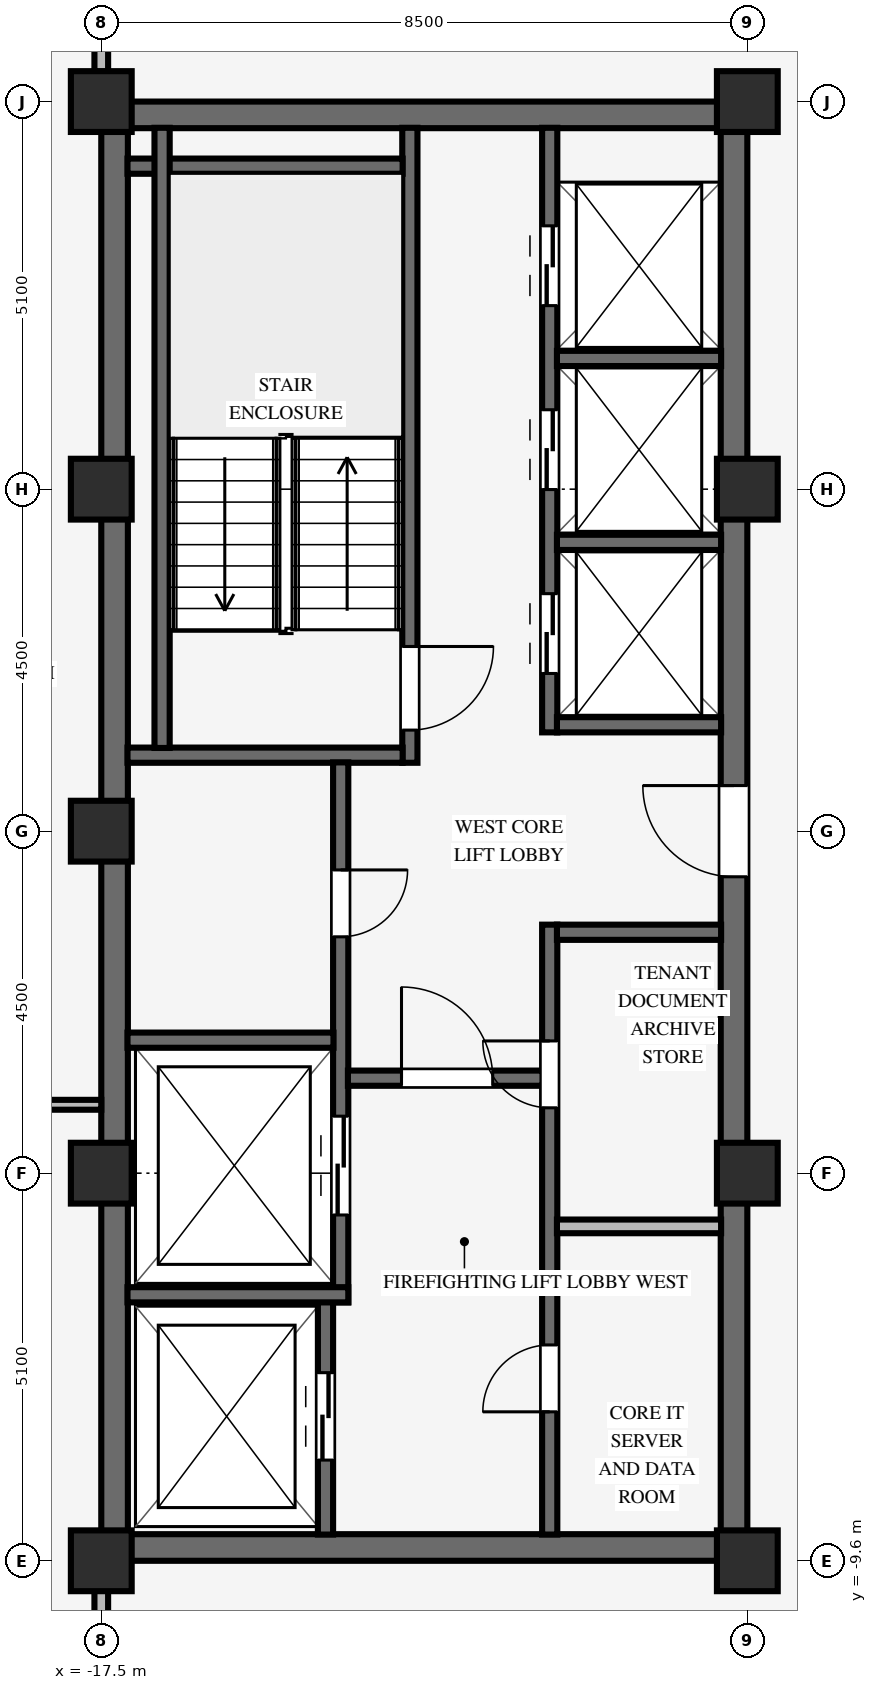
"""IFC4 building model, lengths in metres.
Left out: names, types, materials, properties, quantities, classifications, styles, units other than length and angle.
Written with IfcOpenShell. Run it as: python <this file> out.ifc"""

import sys

from ifc_helpers import new_model, si_unit, direction, frame, frame_2d, origin, origin_2d, place, context, subcontext, project, spatial, rectangle, extrude, source, transform, mapped, element, fill, save


model = new_model("IFC4")
c1 = context("Model", 3, precision=1e-05, world=origin(), true_north=direction((0.0, 1.0)))
c2 = subcontext(c1, "Body", "Model", "MODEL_VIEW")
j1 = project(units=[si_unit("LENGTHUNIT", "METRE"), si_unit("PLANEANGLEUNIT", "RADIAN")], contexts=[c1])
p1 = place(None, origin())
s1 = spatial("IfcSite", under=j1, at=p1, CompositionType="ELEMENT")
p2 = place(p1, origin())
s2 = spatial("IfcBuilding", under=s1, at=p2, CompositionType="ELEMENT")
p3 = place(p2, frame((0.0, 0.0, 272.55)))
s3 = spatial("IfcBuildingStorey", under=s2, at=p3, CompositionType="ELEMENT", Elevation=272.55)
for number, where, z_axis, x_axis in (
    (1, (-17.5, -9.425, 0.0), (0.0, 0.0, 1.0), (1.0, 0.0, 0.0)),
    (2, (-17.5, 9.425, 0.0), (0.0, 0.0, 1.0), (1.0, 0.0, 0.0)),
):
    element("IfcWall", number, at=place(p3, frame(where, z_axis=z_axis, x_axis=x_axis)), inside=s3, PredefinedType="SHEAR", context=c2, shape_type="SweptSolid", body=[
        extrude(rectangle(XDim=8.5, YDim=0.35, at=frame_2d((4.25, 0.0))), origin(), (0.0, 0.0, 1.0), 3.37),
    ])
p4 = place(p3, frame((-17.325, -9.255, 0.0), z_axis=(0.0, 0.0, 1.0), x_axis=(0.0, 1.0, 0.0)))
e3 = element("IfcWall", 3, at=p4, inside=s3, PredefinedType="SHEAR", context=c2, shape_type="SweptSolid", body=[
    extrude(rectangle(XDim=18.51, YDim=0.35, at=frame_2d((9.255, 0.0))), origin(), (0.0, 0.0, 1.0), 3.37),
])
p5 = place(p3, frame((-9.175, -9.255, 0.0), z_axis=(0.0, 0.0, 1.0), x_axis=(0.0, 1.0, 0.0)))
e4 = element("IfcWall", 4, at=p5, inside=s3, PredefinedType="SHEAR", context=c2, shape_type="SweptSolid", body=[
    extrude(rectangle(XDim=18.51, YDim=0.35, at=frame_2d((9.255, 0.0))), origin(), (0.0, 0.0, 1.0), 3.37),
])
p6 = place(p5, frame((8.655, 0.0, 0.0)))
e5 = element("IfcOpeningElement", 5, at=p6, cuts=e4, PredefinedType="OPENING", context=c2, shape_type="SweptSolid", body=[
    extrude(rectangle(XDim=1.2, YDim=2.15, at=frame_2d((0.6, 1.075))), frame((0.0, 0.185, 0.0), z_axis=(0.0, -1.0, 0.0), x_axis=(1.0, 0.0, 0.0)), (0.0, 0.0, 1.0), 0.37),
])
for number, where, z_axis, x_axis in (
    (6, (-17.5, -9.6, 0.0), (0.0, 0.0, 1.0), (1.0, 0.0, 0.0)),
    (7, (-17.5, -4.5, 0.0), (0.0, 0.0, 1.0), (1.0, 0.0, 0.0)),
    (8, (-17.5, 4.5, 0.0), (0.0, 0.0, 1.0), (1.0, 0.0, 0.0)),
    (9, (-17.5, 9.6, 0.0), (0.0, 0.0, 1.0), (1.0, 0.0, 0.0)),
    (10, (-9.0, -9.6, 0.0), (0.0, 0.0, 1.0), (1.0, 0.0, 0.0)),
    (11, (-9.0, -4.5, 0.0), (0.0, 0.0, 1.0), (1.0, 0.0, 0.0)),
    (12, (-9.0, 4.5, 0.0), (0.0, 0.0, 1.0), (1.0, 0.0, 0.0)),
    (13, (-9.0, 9.6, 0.0), (0.0, 0.0, 1.0), (1.0, 0.0, 0.0)),
    (14, (-17.5, 0.0, 0.0), (0.0, 0.0, 1.0), (1.0, 0.0, 0.0)),
):
    element("IfcColumn", number, at=place(p3, frame(where, z_axis=z_axis, x_axis=x_axis)), inside=s3, PredefinedType="COLUMN", context=c2, shape_type="SweptSolid", body=[
        extrude(rectangle(XDim=0.8, YDim=0.8, at=origin_2d()), origin(), (0.0, 0.0, 1.0), 3.37),
    ])
p7 = place(p3, frame((-13.44, 0.9, 0.0), z_axis=(0.0, 0.0, 1.0), x_axis=(0.0, 1.0, 0.0)))
e15 = element("IfcWall", 15, at=p7, inside=s3, PredefinedType="SHEAR", context=c2, shape_type="SweptSolid", body=[
    extrude(rectangle(XDim=8.355, YDim=0.2, at=frame_2d((4.177, 0.0))), origin(), (0.0, 0.0, 1.0), 3.37),
])
p8 = place(p7, frame((1.53, 0.0, 0.0), z_axis=(0.0, 0.0, 1.0), x_axis=(-1.0, 0.0, 0.0)))
e16 = element("IfcOpeningElement", 16, at=p8, cuts=e15, PredefinedType="OPENING", context=c2, shape_type="SweptSolid", body=[
    extrude(rectangle(XDim=1.1, YDim=2.15, at=frame_2d((0.55, 1.075))), frame((0.0, 0.11, 0.0), z_axis=(0.0, -1.0, 0.0), x_axis=(1.0, 0.0, 0.0)), (0.0, 0.0, 1.0), 0.22),
])
for number, where, z_axis, x_axis in (
    (17, (-17.155, 1.0, 0.0), (0.0, 0.0, 1.0), (1.0, 0.0, 0.0)),
    (18, (-17.155, 8.75, 0.0), (0.0, 0.0, 1.0), (1.0, 0.0, 0.0)),
):
    element("IfcWall", number, at=place(p3, frame(where, z_axis=z_axis, x_axis=x_axis)), inside=s3, PredefinedType="SHEAR", context=c2, shape_type="SweptSolid", body=[
        extrude(rectangle(XDim=3.62, YDim=0.2, at=frame_2d((1.81, 0.0))), origin(), (0.0, 0.0, 1.0), 3.37),
    ])
p9 = place(p3, frame((-16.7, 1.095, 0.0), z_axis=(0.0, 0.0, 1.0), x_axis=(0.0, 1.0, 0.0)))
e19 = element("IfcWall", 19, at=p9, inside=s3, PredefinedType="SHEAR", context=c2, shape_type="SweptSolid", body=[
    extrude(rectangle(XDim=8.16, YDim=0.2, at=frame_2d((4.08, 0.0))), origin(), (0.0, 0.0, 1.0), 3.37),
])
p10 = place(p3, frame((-14.55, -9.255, 0.0), z_axis=(0.0, 0.0, 1.0), x_axis=(0.0, 1.0, 0.0)))
e20 = element("IfcWall", 20, at=p10, inside=s3, PredefinedType="SHEAR", context=c2, shape_type="SweptSolid", body=[
    extrude(rectangle(XDim=3.06, YDim=0.2, at=frame_2d((1.53, 0.0))), origin(), (0.0, 0.0, 1.0), 3.37),
])
p11 = place(p10, frame((0.98, 0.0, 0.0)))
e21 = element("IfcOpeningElement", 21, at=p11, cuts=e20, PredefinedType="OPENING", context=c2, shape_type="SweptSolid", body=[
    extrude(rectangle(XDim=1.15, YDim=2.15, at=frame_2d((0.575, 1.075))), frame((0.0, 0.11, 0.0), z_axis=(0.0, -1.0, 0.0), x_axis=(1.0, 0.0, 0.0)), (0.0, 0.0, 1.0), 0.22),
])
p12 = place(p3, frame((-14.35, -6.2, 0.0), z_axis=(0.0, 0.0, 1.0), x_axis=(0.0, 1.0, 0.0)))
e22 = element("IfcWall", 22, at=p12, inside=s3, PredefinedType="SHEAR", context=c2, shape_type="SweptSolid", body=[
    extrude(rectangle(XDim=7.105, YDim=0.2, at=frame_2d((3.552, 0.0))), origin(), (0.0, 0.0, 1.0), 3.37),
])
p13 = place(p12, frame((5.69, 0.0, 0.0), z_axis=(0.0, 0.0, 1.0), x_axis=(-1.0, 0.0, 0.0)))
e23 = element("IfcOpeningElement", 23, at=p13, cuts=e22, PredefinedType="OPENING", context=c2, shape_type="SweptSolid", body=[
    extrude(rectangle(XDim=0.88, YDim=2.1, at=frame_2d((0.44, 1.05))), frame((0.0, 0.11, 0.0), z_axis=(0.0, -1.0, 0.0), x_axis=(1.0, 0.0, 0.0)), (0.0, 0.0, 1.0), 0.22),
])
p14 = place(p12, frame((1.15, 0.0, 0.0)))
e24 = element("IfcOpeningElement", 24, at=p14, cuts=e22, PredefinedType="OPENING", context=c2, shape_type="SweptSolid", body=[
    extrude(rectangle(XDim=1.3, YDim=2.2, at=frame_2d((0.65, 1.1))), frame((0.0, 0.11, 0.0), z_axis=(0.0, -1.0, 0.0), x_axis=(1.0, 0.0, 0.0)), (0.0, 0.0, 1.0), 0.22),
])
p15 = place(p3, frame((-17.155, -6.1, 0.0), z_axis=(0.0, 0.0, 1.0), x_axis=(1.0, 0.0, 0.0)))
e25 = element("IfcWall", 25, at=p15, inside=s3, PredefinedType="SHEAR", context=c2, shape_type="SweptSolid", body=[
    extrude(rectangle(XDim=2.905, YDim=0.2, at=frame_2d((1.453, 0.0))), origin(), (0.0, 0.0, 1.0), 3.37),
])
p16 = place(p3, frame((-17.155, -2.75, 0.0), z_axis=(0.0, 0.0, 1.0), x_axis=(1.0, 0.0, 0.0)))
e26 = element("IfcWall", 26, at=p16, inside=s3, PredefinedType="SHEAR", context=c2, shape_type="SweptSolid", body=[
    extrude(rectangle(XDim=2.71, YDim=0.2, at=frame_2d((1.355, 0.0))), origin(), (0.0, 0.0, 1.0), 3.37),
])
p17 = place(p3, frame((-11.6, -9.255, 0.0), z_axis=(0.0, 0.0, 1.0), x_axis=(0.0, 1.0, 0.0)))
e27 = element("IfcWall", 27, at=p17, inside=s3, PredefinedType="SHEAR", context=c2, shape_type="SweptSolid", body=[
    extrude(rectangle(XDim=8.025, YDim=0.2, at=frame_2d((4.012, 0.0))), origin(), (0.0, 0.0, 1.0), 3.37),
])
p18 = place(p17, frame((1.615, 0.0, 0.0)))
e28 = element("IfcOpeningElement", 28, at=p18, cuts=e27, PredefinedType="OPENING", context=c2, shape_type="SweptSolid", body=[
    extrude(rectangle(XDim=0.88, YDim=2.1, at=frame_2d((0.44, 1.05))), frame((0.0, 0.11, 0.0), z_axis=(0.0, -1.0, 0.0), x_axis=(1.0, 0.0, 0.0)), (0.0, 0.0, 1.0), 0.22),
])
p19 = place(p17, frame((5.615, 0.0, 0.0)))
e29 = element("IfcOpeningElement", 29, at=p19, cuts=e27, PredefinedType="OPENING", context=c2, shape_type="SweptSolid", body=[
    extrude(rectangle(XDim=0.88, YDim=2.1, at=frame_2d((0.44, 1.05))), frame((0.0, 0.11, 0.0), z_axis=(0.0, -1.0, 0.0), x_axis=(1.0, 0.0, 0.0)), (0.0, 0.0, 1.0), 0.22),
])
p20 = place(p3, frame((-14.255, -3.25, 0.0), z_axis=(0.0, 0.0, 1.0), x_axis=(1.0, 0.0, 0.0)))
e30 = element("IfcWall", 30, at=p20, inside=s3, PredefinedType="SHEAR", context=c2, shape_type="SweptSolid", body=[
    extrude(rectangle(XDim=2.56, YDim=0.2, at=frame_2d((1.28, 0.0))), origin(), (0.0, 0.0, 1.0), 3.37),
])
p21 = place(p20, frame((0.705, 0.0, 0.0)))
e31 = element("IfcOpeningElement", 31, at=p21, cuts=e30, PredefinedType="OPENING", context=c2, shape_type="SweptSolid", body=[
    extrude(rectangle(XDim=1.2, YDim=2.15, at=frame_2d((0.6, 1.075))), frame((0.0, 0.11, 0.0), z_axis=(0.0, -1.0, 0.0), x_axis=(1.0, 0.0, 0.0)), (0.0, 0.0, 1.0), 0.22),
])
p22 = place(p3, frame((-11.505, -1.33, 0.0), z_axis=(0.0, 0.0, 1.0), x_axis=(1.0, 0.0, 0.0)))
e32 = element("IfcWall", 32, at=p22, inside=s3, PredefinedType="SHEAR", context=c2, shape_type="SweptSolid", body=[
    extrude(rectangle(XDim=2.16, YDim=0.2, at=frame_2d((1.08, 0.0))), origin(), (0.0, 0.0, 1.0), 3.37),
])
p23 = place(p3, frame((-11.505, -5.2, 0.0), z_axis=(0.0, 0.0, 1.0), x_axis=(1.0, 0.0, 0.0)))
e33 = element("IfcWall", 33, at=p23, inside=s3, PredefinedType="PARTITIONING", context=c2, shape_type="SweptSolid", body=[
    extrude(rectangle(XDim=2.16, YDim=0.18, at=frame_2d((1.08, 0.0))), origin(), (0.0, 0.0, 1.0), 3.36),
])
p24 = place(p3, frame((-11.6, 1.3, 0.0), z_axis=(0.0, 0.0, 1.0), x_axis=(0.0, 1.0, 0.0)))
e34 = element("IfcWall", 34, at=p24, inside=s3, PredefinedType="SHEAR", context=c2, shape_type="SweptSolid", body=[
    extrude(rectangle(XDim=7.955, YDim=0.2, at=frame_2d((3.978, 0.0))), origin(), (0.0, 0.0, 1.0), 3.37),
])
p25 = place(p24, frame((0.775, 0.0, 0.0)))
e35 = element("IfcOpeningElement", 35, at=p25, cuts=e34, PredefinedType="OPENING", context=c2, shape_type="SweptSolid", body=[
    extrude(rectangle(XDim=1.05, YDim=2.15, at=frame_2d((0.525, 1.075))), frame((0.0, 0.11, 0.0), z_axis=(0.0, -1.0, 0.0), x_axis=(1.0, 0.0, 0.0)), (0.0, 0.0, 1.0), 0.22),
])
p26 = place(p24, frame((3.195, 0.0, 0.0)))
e36 = element("IfcOpeningElement", 36, at=p26, cuts=e34, PredefinedType="OPENING", context=c2, shape_type="SweptSolid", body=[
    extrude(rectangle(XDim=1.05, YDim=2.15, at=frame_2d((0.525, 1.075))), frame((0.0, 0.11, 0.0), z_axis=(0.0, -1.0, 0.0), x_axis=(1.0, 0.0, 0.0)), (0.0, 0.0, 1.0), 0.22),
])
p27 = place(p24, frame((5.615, 0.0, 0.0)))
e37 = element("IfcOpeningElement", 37, at=p27, cuts=e34, PredefinedType="OPENING", context=c2, shape_type="SweptSolid", body=[
    extrude(rectangle(XDim=1.05, YDim=2.15, at=frame_2d((0.525, 1.075))), frame((0.0, 0.11, 0.0), z_axis=(0.0, -1.0, 0.0), x_axis=(1.0, 0.0, 0.0)), (0.0, 0.0, 1.0), 0.22),
])
for number, where, z_axis, x_axis in (
    (38, (-11.505, 1.4, 0.0), (0.0, 0.0, 1.0), (1.0, 0.0, 0.0)),
    (39, (-11.505, 3.8, 0.0), (0.0, 0.0, 1.0), (1.0, 0.0, 0.0)),
    (40, (-11.505, 6.22, 0.0), (0.0, 0.0, 1.0), (1.0, 0.0, 0.0)),
):
    element("IfcWall", number, at=place(p3, frame(where, z_axis=z_axis, x_axis=x_axis)), inside=s3, PredefinedType="SHEAR", context=c2, shape_type="SweptSolid", body=[
        extrude(rectangle(XDim=2.16, YDim=0.2, at=frame_2d((1.08, 0.0))), origin(), (0.0, 0.0, 1.0), 3.37),
    ])
p28 = place(p3, frame((-20.7, -3.6, 0.0), z_axis=(0.0, 0.0, 1.0), x_axis=(1.0, 0.0, 0.0)))
e41 = element("IfcWall", 41, at=p28, inside=s3, PredefinedType="PARTITIONING", context=c2, shape_type="SweptSolid", body=[
    extrude(rectangle(XDim=3.2, YDim=0.13, at=frame_2d((1.6, 0.0))), origin(), (0.0, 0.0, 1.0), 3.36),
])
for number, where, z_axis, x_axis in (
    (42, (-17.5, -11.114, 0.0), (0.0, 0.0, 1.0), (0.0, 1.0, 0.0)),
    (43, (-17.5, 9.996, 0.0), (0.0, 0.0, 1.0), (0.0, 1.0, 0.0)),
):
    element("IfcWall", number, at=place(p3, frame(where, z_axis=z_axis, x_axis=x_axis)), inside=s3, PredefinedType="PARTITIONING", context=c2, shape_type="SweptSolid", body=[
        extrude(rectangle(XDim=1.118, YDim=0.18, at=frame_2d((0.559, 0.0))), origin(), (0.0, 0.0, 1.0), 2.892),
    ])
m1 = source(origin(), c2, "Body", "SweptSolid", [
    extrude(rectangle(XDim=1.1, YDim=2.15, at=frame_2d((0.55, 1.075))), frame((0.0, 0.025, 0.0), z_axis=(0.0, -1.0, 0.0), x_axis=(1.0, 0.0, 0.0)), (0.0, 0.0, 1.0), 0.05),
])
p29 = place(p8, origin())
e44 = element("IfcDoor", 44, at=p29, inside=s3, OperationType="SINGLE_SWING_LEFT", PredefinedType="DOOR", context=c2, shape_type="MappedRepresentation", body=[
    mapped(m1, transform((0.0, 0.0, 0.0), scale=1.0)),
])
fill(e16, e44)
m2 = source(origin(), c2, "Body", "SweptSolid", [
    extrude(rectangle(XDim=0.88, YDim=2.1, at=frame_2d((0.44, 1.05))), frame((0.0, 0.025, 0.0), z_axis=(0.0, -1.0, 0.0), x_axis=(1.0, 0.0, 0.0)), (0.0, 0.0, 1.0), 0.05),
])
p30 = place(p13, origin())
e45 = element("IfcDoor", 45, at=p30, inside=s3, OperationType="SINGLE_SWING_LEFT", PredefinedType="DOOR", context=c2, shape_type="MappedRepresentation", body=[
    mapped(m2, transform((0.0, 0.0, 0.0), scale=1.0)),
])
fill(e23, e45)
m3 = source(origin(), c2, "Body", "SweptSolid", [
    extrude(rectangle(XDim=1.2, YDim=2.15, at=frame_2d((0.6, 1.075))), frame((0.0, 0.025, 0.0), z_axis=(0.0, -1.0, 0.0), x_axis=(1.0, 0.0, 0.0)), (0.0, 0.0, 1.0), 0.05),
])
p31 = place(p21, origin())
e46 = element("IfcDoor", 46, at=p31, inside=s3, OperationType="SINGLE_SWING_LEFT", PredefinedType="DOOR", context=c2, shape_type="MappedRepresentation", body=[
    mapped(m3, transform((0.0, 0.0, 0.0), scale=1.0)),
])
fill(e31, e46)
p32 = place(p18, origin())
e47 = element("IfcDoor", 47, at=p32, inside=s3, OperationType="SINGLE_SWING_LEFT", PredefinedType="DOOR", context=c2, shape_type="MappedRepresentation", body=[
    mapped(m2, transform((0.0, 0.0, 0.0), scale=1.0)),
])
fill(e28, e47)
p33 = place(p19, origin())
e48 = element("IfcDoor", 48, at=p33, inside=s3, OperationType="SINGLE_SWING_RIGHT", PredefinedType="DOOR", context=c2, shape_type="MappedRepresentation", body=[
    mapped(m2, transform((0.0, 0.0, 0.0), scale=1.0)),
])
fill(e29, e48)
p34 = place(p6, origin())
e49 = element("IfcDoor", 49, at=p34, inside=s3, OperationType="SINGLE_SWING_RIGHT", PredefinedType="DOOR", context=c2, shape_type="MappedRepresentation", body=[
    mapped(m3, transform((0.0, 0.0, 0.0), scale=1.0)),
])
fill(e5, e49)
m4 = source(origin(), c2, "Body", "SweptSolid", [
    extrude(rectangle(XDim=1.15, YDim=2.15, at=frame_2d((0.575, 1.075))), frame((0.0, 0.025, 0.0), z_axis=(0.0, -1.0, 0.0), x_axis=(1.0, 0.0, 0.0)), (0.0, 0.0, 1.0), 0.05),
])
p35 = place(p11, origin())
e50 = element("IfcDoor", 50, at=p35, inside=s3, OperationType="DOUBLE_DOOR_SLIDING", PredefinedType="DOOR", context=c2, shape_type="MappedRepresentation", body=[
    mapped(m4, transform((0.0, 0.0, 0.0), scale=1.0)),
])
fill(e21, e50)
m5 = source(origin(), c2, "Body", "SweptSolid", [
    extrude(rectangle(XDim=1.3, YDim=2.2, at=frame_2d((0.65, 1.1))), frame((0.0, 0.025, 0.0), z_axis=(0.0, -1.0, 0.0), x_axis=(1.0, 0.0, 0.0)), (0.0, 0.0, 1.0), 0.05),
])
p36 = place(p14, origin())
e51 = element("IfcDoor", 51, at=p36, inside=s3, OperationType="DOUBLE_DOOR_SLIDING", PredefinedType="DOOR", context=c2, shape_type="MappedRepresentation", body=[
    mapped(m5, transform((0.0, 0.0, 0.0), scale=1.0)),
])
fill(e24, e51)
m6 = source(origin(), c2, "Body", "SweptSolid", [
    extrude(rectangle(XDim=1.05, YDim=2.15, at=frame_2d((0.525, 1.075))), frame((0.0, 0.025, 0.0), z_axis=(0.0, -1.0, 0.0), x_axis=(1.0, 0.0, 0.0)), (0.0, 0.0, 1.0), 0.05),
])
p37 = place(p25, origin())
e52 = element("IfcDoor", 52, at=p37, inside=s3, OperationType="DOUBLE_DOOR_SLIDING", PredefinedType="DOOR", context=c2, shape_type="MappedRepresentation", body=[
    mapped(m6, transform((0.0, 0.0, 0.0), scale=1.0)),
])
fill(e35, e52)
p38 = place(p26, origin())
e53 = element("IfcDoor", 53, at=p38, inside=s3, OperationType="DOUBLE_DOOR_SLIDING", PredefinedType="DOOR", context=c2, shape_type="MappedRepresentation", body=[
    mapped(m6, transform((0.0, 0.0, 0.0), scale=1.0)),
])
fill(e36, e53)
p39 = place(p27, origin())
e54 = element("IfcDoor", 54, at=p39, inside=s3, OperationType="DOUBLE_DOOR_SLIDING", PredefinedType="DOOR", context=c2, shape_type="MappedRepresentation", body=[
    mapped(m6, transform((0.0, 0.0, 0.0), scale=1.0)),
])
fill(e37, e54)
save(model, sys.argv[1])
